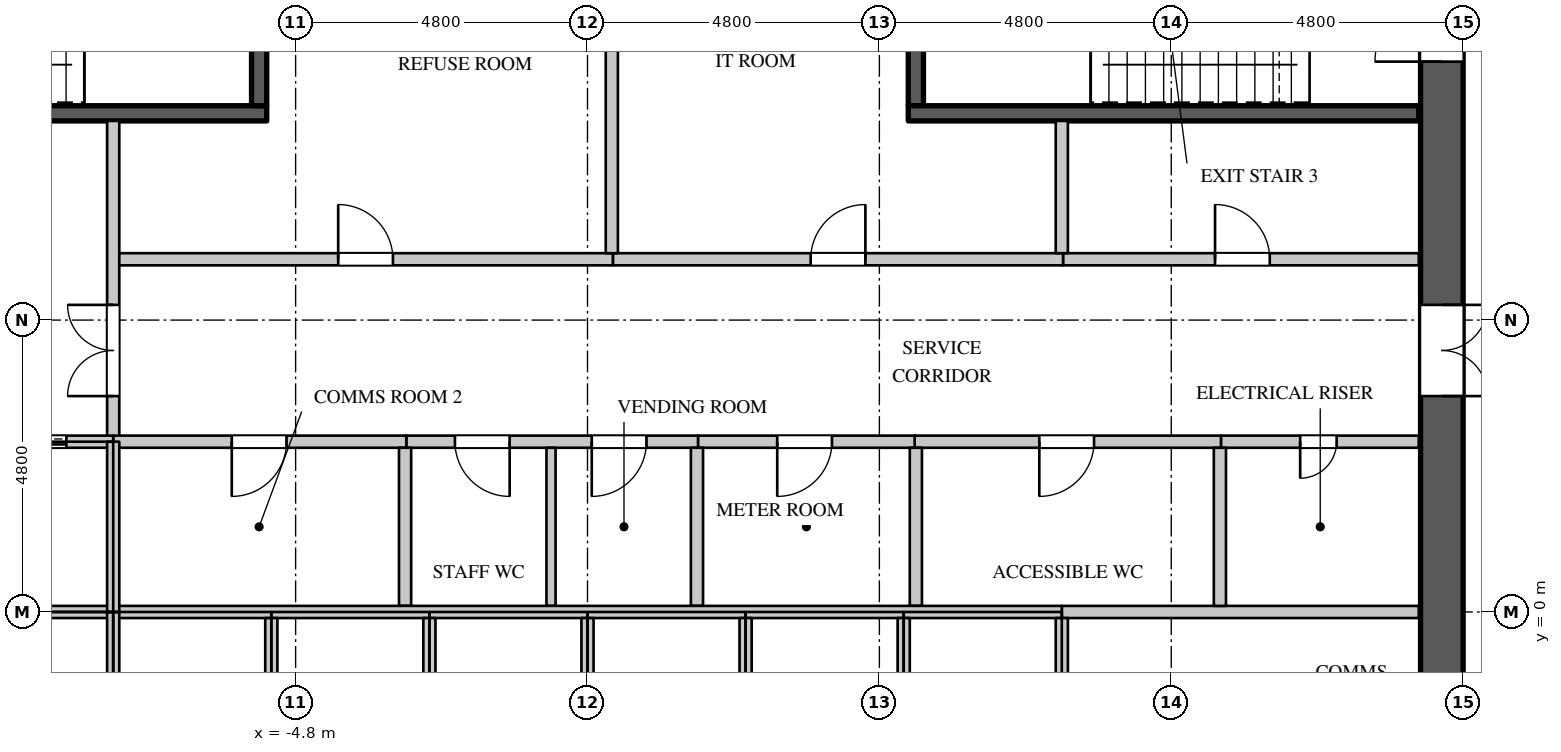
"""IFC4 building model, lengths in metres.
Left out: names, types, materials, properties, quantities, classifications, styles, units other than length and angle.
Written with IfcOpenShell. Run it as: python <this file> out.ifc"""

import sys

from ifc_helpers import new_model, si_unit, direction, frame, frame_2d, origin, place, context, subcontext, project, spatial, rectangle, extrude, element, fill, save


model = new_model("IFC4")
c1 = context("Model", 3, precision=1e-05, world=origin(), true_north=direction((0.0, 1.0)))
c2 = subcontext(c1, "Body", "Model", "MODEL_VIEW")
j1 = project(units=[si_unit("LENGTHUNIT", "METRE"), si_unit("PLANEANGLEUNIT", "RADIAN")], contexts=[c1])
p1 = place(None, origin())
s1 = spatial("IfcSite", under=j1, at=p1, CompositionType="ELEMENT")
p2 = place(p1, origin())
s2 = spatial("IfcBuilding", under=s1, at=p2, CompositionType="ELEMENT")
p3 = place(p2, frame((0.0, 0.0, 187.5)))
s3 = spatial("IfcBuildingStorey", under=s2, at=p3, CompositionType="ELEMENT", Elevation=187.5)
p4 = place(p3, frame((14.05, -11.3, 0.0), z_axis=(0.0, 0.0, 1.0), x_axis=(0.0, 1.0, 0.0)))
e1 = element("IfcWall", 1, at=p4, inside=s3, PredefinedType="SHEAR", context=c2, shape_type="SweptSolid", body=[
    extrude(rectangle(XDim=22.6, YDim=0.7, at=frame_2d((11.3, 0.0))), origin(), (0.0, 0.0, 1.0), 4.2),
])
p5 = place(p4, frame((20.35, 0.0, 0.0)))
e2 = element("IfcOpeningElement", 2, at=p5, cuts=e1, PredefinedType="OPENING", context=c2, shape_type="SweptSolid", body=[
    extrude(rectangle(XDim=1.1, YDim=2.2, at=frame_2d((0.55, 1.1))), frame((0.0, 0.36, 0.0), z_axis=(0.0, -1.0, 0.0), x_axis=(1.0, 0.0, 0.0)), (0.0, 0.0, 1.0), 0.72),
])
p6 = place(p4, frame((1.15, 0.0, 0.0)))
e3 = element("IfcOpeningElement", 3, at=p6, cuts=e1, PredefinedType="OPENING", context=c2, shape_type="SweptSolid", body=[
    extrude(rectangle(XDim=1.1, YDim=2.2, at=frame_2d((0.55, 1.1))), frame((0.0, 0.36, 0.0), z_axis=(0.0, -1.0, 0.0), x_axis=(1.0, 0.0, 0.0)), (0.0, 0.0, 1.0), 0.72),
])
p7 = place(p4, frame((14.85, 0.0, 0.0)))
e4 = element("IfcOpeningElement", 4, at=p7, cuts=e1, PredefinedType="OPENING", context=c2, shape_type="SweptSolid", body=[
    extrude(rectangle(XDim=1.5, YDim=2.4, at=frame_2d((0.75, 1.2))), frame((0.0, 0.36, 0.0), z_axis=(0.0, -1.0, 0.0), x_axis=(1.0, 0.0, 0.0)), (0.0, 0.0, 1.0), 0.72),
])
p8 = place(p4, frame((6.25, 0.0, 0.0)))
e5 = element("IfcOpeningElement", 5, at=p8, cuts=e1, PredefinedType="OPENING", context=c2, shape_type="SweptSolid", body=[
    extrude(rectangle(XDim=1.5, YDim=2.4, at=frame_2d((0.75, 1.2))), frame((0.0, 0.36, 0.0), z_axis=(0.0, -1.0, 0.0), x_axis=(1.0, 0.0, 0.0)), (0.0, 0.0, 1.0), 0.72),
])
p9 = place(p3, frame((-7.8, 2.8, 0.0), z_axis=(0.0, 0.0, 1.0), x_axis=(0.0, 1.0, 0.0)))
e6 = element("IfcWall", 6, at=p9, inside=s3, PredefinedType="PARTITIONING", context=c2, shape_type="SweptSolid", body=[
    extrude(rectangle(XDim=5.275, YDim=0.2, at=frame_2d((2.637, 0.0))), origin(), (0.0, 0.0, 1.0), 3.95),
])
p10 = place(p9, frame((0.75, 0.0, 0.0)))
e7 = element("IfcOpeningElement", 7, at=p10, cuts=e6, PredefinedType="OPENING", context=c2, shape_type="SweptSolid", body=[
    extrude(rectangle(XDim=1.5, YDim=2.4, at=frame_2d((0.75, 1.2))), frame((0.0, 0.11, 0.0), z_axis=(0.0, -1.0, 0.0), x_axis=(1.0, 0.0, 0.0)), (0.0, 0.0, 1.0), 0.22),
])
p11 = place(p3, frame((-7.7, 5.8, 0.0), z_axis=(0.0, 0.0, 1.0), x_axis=(1.0, 0.0, 0.0)))
e8 = element("IfcWall", 8, at=p11, inside=s3, PredefinedType="PARTITIONING", context=c2, shape_type="SweptSolid", body=[
    extrude(rectangle(XDim=8.12, YDim=0.2, at=frame_2d((4.06, 0.0))), origin(), (0.0, 0.0, 1.0), 3.95),
])
p12 = place(p11, frame((3.6, 0.0, 0.0)))
e9 = element("IfcOpeningElement", 9, at=p12, cuts=e8, PredefinedType="OPENING", context=c2, shape_type="SweptSolid", body=[
    extrude(rectangle(XDim=0.9, YDim=2.2, at=frame_2d((0.45, 1.1))), frame((0.0, 0.11, 0.0), z_axis=(0.0, -1.0, 0.0), x_axis=(1.0, 0.0, 0.0)), (0.0, 0.0, 1.0), 0.22),
])
p13 = place(p3, frame((-2.98, 2.8, 0.0), z_axis=(0.0, 0.0, 1.0), x_axis=(1.0, 0.0, 0.0)))
e10 = element("IfcWall", 10, at=p13, inside=s3, PredefinedType="PARTITIONING", context=c2, shape_type="SweptSolid", body=[
    extrude(rectangle(XDim=4.8, YDim=0.2, at=frame_2d((2.4, 0.0))), origin(), (0.0, 0.0, 1.0), 3.95),
])
p14 = place(p13, frame((0.8, 0.0, 0.0)))
e11 = element("IfcOpeningElement", 11, at=p14, cuts=e10, PredefinedType="OPENING", context=c2, shape_type="SweptSolid", body=[
    extrude(rectangle(XDim=0.9, YDim=2.2, at=frame_2d((0.45, 1.1))), frame((0.0, 0.11, 0.0), z_axis=(0.0, -1.0, 0.0), x_axis=(1.0, 0.0, 0.0)), (0.0, 0.0, 1.0), 0.22),
])
p15 = place(p13, frame((3.05, 0.0, 0.0)))
e12 = element("IfcOpeningElement", 12, at=p15, cuts=e10, PredefinedType="OPENING", context=c2, shape_type="SweptSolid", body=[
    extrude(rectangle(XDim=0.9, YDim=2.2, at=frame_2d((0.45, 1.1))), frame((0.0, 0.11, 0.0), z_axis=(0.0, -1.0, 0.0), x_axis=(1.0, 0.0, 0.0)), (0.0, 0.0, 1.0), 0.22),
])
p16 = place(p3, frame((5.38, 2.8, 0.0), z_axis=(0.0, 0.0, 1.0), x_axis=(1.0, 0.0, 0.0)))
e13 = element("IfcWall", 13, at=p16, inside=s3, PredefinedType="PARTITIONING", context=c2, shape_type="SweptSolid", body=[
    extrude(rectangle(XDim=5.04, YDim=0.2, at=frame_2d((2.52, 0.0))), origin(), (0.0, 0.0, 1.0), 3.95),
])
p17 = place(p16, frame((2.05, 0.0, 0.0)))
e14 = element("IfcOpeningElement", 14, at=p17, cuts=e13, PredefinedType="OPENING", context=c2, shape_type="SweptSolid", body=[
    extrude(rectangle(XDim=0.9, YDim=2.2, at=frame_2d((0.45, 1.1))), frame((0.0, 0.11, 0.0), z_axis=(0.0, -1.0, 0.0), x_axis=(1.0, 0.0, 0.0)), (0.0, 0.0, 1.0), 0.22),
])
p18 = place(p3, frame((7.82, 5.8, 0.0), z_axis=(0.0, 0.0, 1.0), x_axis=(1.0, 0.0, 0.0)))
e15 = element("IfcWall", 15, at=p18, inside=s3, PredefinedType="PARTITIONING", context=c2, shape_type="SweptSolid", body=[
    extrude(rectangle(XDim=5.85, YDim=0.2, at=frame_2d((2.925, 0.0))), origin(), (0.0, 0.0, 1.0), 3.95),
])
p19 = place(p18, frame((2.5, 0.0, 0.0)))
e16 = element("IfcOpeningElement", 16, at=p19, cuts=e15, PredefinedType="OPENING", context=c2, shape_type="SweptSolid", body=[
    extrude(rectangle(XDim=0.9, YDim=2.2, at=frame_2d((0.45, 1.1))), frame((0.0, 0.11, 0.0), z_axis=(0.0, -1.0, 0.0), x_axis=(1.0, 0.0, 0.0)), (0.0, 0.0, 1.0), 0.22),
])
p20 = place(p3, frame((-0.6, 0.1, 0.0), z_axis=(0.0, 0.0, 1.0), x_axis=(0.0, 1.0, 0.0)))
e17 = element("IfcWall", 17, at=p20, inside=s3, PredefinedType="PARTITIONING", context=c2, shape_type="SweptSolid", body=[
    extrude(rectangle(XDim=2.6, YDim=0.15, at=frame_2d((1.3, 0.0))), origin(), (0.0, 0.0, 1.0), 3.95),
])
p21 = place(p3, frame((-7.8, 2.8, 0.0), z_axis=(0.0, 0.0, 1.0), x_axis=(1.0, 0.0, 0.0)))
e18 = element("IfcWall", 18, at=p21, inside=s3, PredefinedType="PARTITIONING", context=c2, shape_type="SweptSolid", body=[
    extrude(rectangle(XDim=4.82, YDim=0.2, at=frame_2d((2.41, 0.0))), origin(), (0.0, 0.0, 1.0), 3.95),
])
p22 = place(p21, frame((1.95, 0.0, 0.0)))
e19 = element("IfcOpeningElement", 19, at=p22, cuts=e18, PredefinedType="OPENING", context=c2, shape_type="SweptSolid", body=[
    extrude(rectangle(XDim=0.9, YDim=2.2, at=frame_2d((0.45, 1.1))), frame((0.0, 0.11, 0.0), z_axis=(0.0, -1.0, 0.0), x_axis=(1.0, 0.0, 0.0)), (0.0, 0.0, 1.0), 0.22),
])
p23 = place(p3, frame((-3.0, 0.1, 0.0), z_axis=(0.0, 0.0, 1.0), x_axis=(0.0, 1.0, 0.0)))
e20 = element("IfcWall", 20, at=p23, inside=s3, PredefinedType="PARTITIONING", context=c2, shape_type="SweptSolid", body=[
    extrude(rectangle(XDim=2.6, YDim=0.2, at=frame_2d((1.3, 0.0))), origin(), (0.0, 0.0, 1.0), 3.95),
])
p24 = place(p3, frame((0.42, 5.8, 0.0), z_axis=(0.0, 0.0, 1.0), x_axis=(1.0, 0.0, 0.0)))
e21 = element("IfcWall", 21, at=p24, inside=s3, PredefinedType="PARTITIONING", context=c2, shape_type="SweptSolid", body=[
    extrude(rectangle(XDim=7.4, YDim=0.2, at=frame_2d((3.7, 0.0))), origin(), (0.0, 0.0, 1.0), 3.95),
])
p25 = place(p24, frame((3.25, 0.0, 0.0)))
e22 = element("IfcOpeningElement", 22, at=p25, cuts=e21, PredefinedType="OPENING", context=c2, shape_type="SweptSolid", body=[
    extrude(rectangle(XDim=0.9, YDim=2.2, at=frame_2d((0.45, 1.1))), frame((0.0, 0.11, 0.0), z_axis=(0.0, -1.0, 0.0), x_axis=(1.0, 0.0, 0.0)), (0.0, 0.0, 1.0), 0.22),
])
p26 = place(p3, frame((0.4, 5.9, 0.0), z_axis=(0.0, 0.0, 1.0), x_axis=(0.0, 1.0, 0.0)))
e23 = element("IfcWall", 23, at=p26, inside=s3, PredefinedType="PARTITIONING", context=c2, shape_type="SweptSolid", body=[
    extrude(rectangle(XDim=5.37, YDim=0.2, at=frame_2d((2.685, 0.0))), origin(), (0.0, 0.0, 1.0), 3.95),
])
p27 = place(p3, frame((1.82, 2.8, 0.0), z_axis=(0.0, 0.0, 1.0), x_axis=(1.0, 0.0, 0.0)))
e24 = element("IfcWall", 24, at=p27, inside=s3, PredefinedType="PARTITIONING", context=c2, shape_type="SweptSolid", body=[
    extrude(rectangle(XDim=3.56, YDim=0.2, at=frame_2d((1.78, 0.0))), origin(), (0.0, 0.0, 1.0), 3.95),
])
p28 = place(p27, frame((1.3, 0.0, 0.0)))
e25 = element("IfcOpeningElement", 25, at=p28, cuts=e24, PredefinedType="OPENING", context=c2, shape_type="SweptSolid", body=[
    extrude(rectangle(XDim=0.9, YDim=2.2, at=frame_2d((0.45, 1.1))), frame((0.0, 0.11, 0.0), z_axis=(0.0, -1.0, 0.0), x_axis=(1.0, 0.0, 0.0)), (0.0, 0.0, 1.0), 0.22),
])
for number, where, z_axis, x_axis in (
    (26, (1.8, 0.1, 0.0), (0.0, 0.0, 1.0), (0.0, 1.0, 0.0)),
    (27, (5.4, 0.1, 0.0), (0.0, 0.0, 1.0), (0.0, 1.0, 0.0)),
):
    element("IfcWall", number, at=place(p3, frame(where, z_axis=z_axis, x_axis=x_axis)), inside=s3, PredefinedType="PARTITIONING", context=c2, shape_type="SweptSolid", body=[
        extrude(rectangle(XDim=2.6, YDim=0.2, at=frame_2d((1.3, 0.0))), origin(), (0.0, 0.0, 1.0), 3.95),
    ])
p29 = place(p3, frame((7.8, 0.0, 0.0), z_axis=(0.0, 0.0, 1.0), x_axis=(1.0, 0.0, 0.0)))
e28 = element("IfcWall", 28, at=p29, inside=s3, PredefinedType="PARTITIONING", context=c2, shape_type="SweptSolid", body=[
    extrude(rectangle(XDim=5.87, YDim=0.2, at=frame_2d((2.935, 0.0))), origin(), (0.0, 0.0, 1.0), 3.95),
])
p30 = place(p3, frame((7.8, 5.9, 0.0), z_axis=(0.0, 0.0, 1.0), x_axis=(0.0, 1.0, 0.0)))
e29 = element("IfcWall", 29, at=p30, inside=s3, PredefinedType="PARTITIONING", context=c2, shape_type="SweptSolid", body=[
    extrude(rectangle(XDim=2.175, YDim=0.2, at=frame_2d((1.087, 0.0))), origin(), (0.0, 0.0, 1.0), 3.95),
])
p31 = place(p3, frame((10.42, 2.8, 0.0), z_axis=(0.0, 0.0, 1.0), x_axis=(1.0, 0.0, 0.0)))
e30 = element("IfcWall", 30, at=p31, inside=s3, PredefinedType="PARTITIONING", context=c2, shape_type="SweptSolid", body=[
    extrude(rectangle(XDim=3.25, YDim=0.2, at=frame_2d((1.625, 0.0))), origin(), (0.0, 0.0, 1.0), 3.95),
])
p32 = place(p31, frame((1.3, 0.0, 0.0)))
e31 = element("IfcOpeningElement", 31, at=p32, cuts=e30, PredefinedType="OPENING", context=c2, shape_type="SweptSolid", body=[
    extrude(rectangle(XDim=0.6, YDim=2.0, at=frame_2d((0.3, 1.0))), frame((0.0, 0.11, 0.0), z_axis=(0.0, -1.0, 0.0), x_axis=(1.0, 0.0, 0.0)), (0.0, 0.0, 1.0), 0.22),
])
p33 = place(p3, frame((10.4, 0.1, 0.0), z_axis=(0.0, 0.0, 1.0), x_axis=(0.0, 1.0, 0.0)))
e32 = element("IfcWall", 32, at=p33, inside=s3, PredefinedType="PARTITIONING", context=c2, shape_type="SweptSolid", body=[
    extrude(rectangle(XDim=2.6, YDim=0.2, at=frame_2d((1.3, 0.0))), origin(), (0.0, 0.0, 1.0), 3.95),
])
p34 = place(p3, frame((-13.67, 0.0, 0.0), z_axis=(0.0, 0.0, 1.0), x_axis=(1.0, 0.0, 0.0)))
e33 = element("IfcWall", 33, at=p34, inside=s3, PredefinedType="PARTITIONING", context=c2, shape_type="SweptSolid", body=[
    extrude(rectangle(XDim=21.47, YDim=0.2, at=frame_2d((10.735, 0.0))), origin(), (0.0, 0.0, 1.0), 3.95),
])
p35 = place(p3, frame((-13.67, 2.8, 0.0), z_axis=(0.0, 0.0, 1.0), x_axis=(1.0, 0.0, 0.0)))
e34 = element("IfcWall", 34, at=p35, inside=s3, PredefinedType="PARTITIONING", context=c2, shape_type="SweptSolid", body=[
    extrude(rectangle(XDim=5.87, YDim=0.2, at=frame_2d((2.935, 0.0))), origin(), (0.0, 0.0, 1.0), 3.95),
])
p36 = place(p35, frame((1.05, 0.0, 0.0)))
e35 = element("IfcOpeningElement", 35, at=p36, cuts=e34, PredefinedType="OPENING", context=c2, shape_type="SweptSolid", body=[
    extrude(rectangle(XDim=1.1, YDim=2.2, at=frame_2d((0.55, 1.1))), frame((0.0, 0.11, 0.0), z_axis=(0.0, -1.0, 0.0), x_axis=(1.0, 0.0, 0.0)), (0.0, 0.0, 1.0), 0.22),
])
p37 = place(p35, frame((4.0, 0.0, 0.0)))
e36 = element("IfcOpeningElement", 36, at=p37, cuts=e34, PredefinedType="OPENING", context=c2, shape_type="SweptSolid", body=[
    extrude(rectangle(XDim=1.1, YDim=2.2, at=frame_2d((0.55, 1.1))), frame((0.0, 0.11, 0.0), z_axis=(0.0, -1.0, 0.0), x_axis=(1.0, 0.0, 0.0)), (0.0, 0.0, 1.0), 0.22),
])
for number, where, z_axis, x_axis in (
    (37, (-7.8, -2.8, 0.0), (0.0, 0.0, 1.0), (0.0, 1.0, 0.0)),
    (38, (-7.8, 0.0, 0.0), (0.0, 0.0, 1.0), (0.0, 1.0, 0.0)),
):
    element("IfcWall", number, at=place(p3, frame(where, z_axis=z_axis, x_axis=x_axis)), inside=s3, PredefinedType="PARTITIONING", context=c2, shape_type="SweptSolid", body=[
        extrude(rectangle(XDim=2.8, YDim=0.2, at=frame_2d((1.4, 0.0))), origin(), (0.0, 0.0, 1.0), 3.95),
    ])
for number, where, z_axis, x_axis in (
    (39, (-5.2, -2.7, 0.0), (0.0, 0.0, 1.0), (0.0, 1.0, 0.0)),
    (40, (-2.6, -2.7, 0.0), (0.0, 0.0, 1.0), (0.0, 1.0, 0.0)),
    (41, (0.0, -2.7, 0.0), (0.0, 0.0, 1.0), (0.0, 1.0, 0.0)),
    (42, (2.6, -2.7, 0.0), (0.0, 0.0, 1.0), (0.0, 1.0, 0.0)),
    (43, (5.2, -2.7, 0.0), (0.0, 0.0, 1.0), (0.0, 1.0, 0.0)),
    (44, (7.8, -2.7, 0.0), (0.0, 0.0, 1.0), (0.0, 1.0, 0.0)),
):
    element("IfcWall", number, at=place(p3, frame(where, z_axis=z_axis, x_axis=x_axis)), inside=s3, PredefinedType="PARTITIONING", context=c2, shape_type="SweptSolid", body=[
        extrude(rectangle(XDim=2.6, YDim=0.2, at=frame_2d((1.3, 0.0))), origin(), (0.0, 0.0, 1.0), 3.95),
    ])
p38 = place(p3, frame((-13.67, 8.2, 0.0), z_axis=(0.0, 0.0, 1.0), x_axis=(1.0, 0.0, 0.0)))
e45 = element("IfcWall", 45, at=p38, inside=s3, PredefinedType="SHEAR", context=c2, shape_type="SweptSolid", body=[
    extrude(rectangle(XDim=8.395, YDim=0.25, at=frame_2d((4.198, 0.0))), origin(), (0.0, 0.0, 1.0), 3.95),
])
p39 = place(p38, frame((0.15, 0.0, 0.0)))
e46 = element("IfcOpeningElement", 46, at=p39, cuts=e45, PredefinedType="OPENING", context=c2, shape_type="SweptSolid", body=[
    extrude(rectangle(XDim=1.1, YDim=2.2, at=frame_2d((0.55, 1.1))), frame((0.0, 0.135, 0.0), z_axis=(0.0, -1.0, 0.0), x_axis=(1.0, 0.0, 0.0)), (0.0, 0.0, 1.0), 0.27),
])
for number, where, z_axis, x_axis in (
    (47, (-5.4, 8.325, 0.0), (0.0, 0.0, 1.0), (0.0, 1.0, 0.0)),
    (48, (5.4, 8.325, 0.0), (0.0, 0.0, 1.0), (0.0, 1.0, 0.0)),
):
    element("IfcWall", number, at=place(p3, frame(where, z_axis=z_axis, x_axis=x_axis)), inside=s3, PredefinedType="SHEAR", context=c2, shape_type="SweptSolid", body=[
        extrude(rectangle(XDim=2.945, YDim=0.25, at=frame_2d((1.473, 0.0))), origin(), (0.0, 0.0, 1.0), 3.95),
    ])
p40 = place(p3, frame((5.275, 8.2, 0.0), z_axis=(0.0, 0.0, 1.0), x_axis=(1.0, 0.0, 0.0)))
e49 = element("IfcWall", 49, at=p40, inside=s3, PredefinedType="SHEAR", context=c2, shape_type="SweptSolid", body=[
    extrude(rectangle(XDim=8.395, YDim=0.25, at=frame_2d((4.198, 0.0))), origin(), (0.0, 0.0, 1.0), 3.95),
])
p41 = place(p32, origin())
e50 = element("IfcDoor", 50, at=p41, inside=s3, OperationType="SINGLE_SWING_RIGHT", PredefinedType="DOOR", context=c2, shape_type="SweptSolid", body=[
    extrude(rectangle(XDim=0.6, YDim=2.0, at=frame_2d((0.3, 1.0))), frame((0.0, 0.025, 0.0), z_axis=(0.0, -1.0, 0.0), x_axis=(1.0, 0.0, 0.0)), (0.0, 0.0, 1.0), 0.05),
])
fill(e31, e50)
p42 = place(p12, origin())
e51 = element("IfcDoor", 51, at=p42, inside=s3, OperationType="SINGLE_SWING_LEFT", PredefinedType="DOOR", context=c2, shape_type="SweptSolid", body=[
    extrude(rectangle(XDim=0.9, YDim=2.2, at=frame_2d((0.45, 1.1))), frame((0.0, 0.025, 0.0), z_axis=(0.0, -1.0, 0.0), x_axis=(1.0, 0.0, 0.0)), (0.0, 0.0, 1.0), 0.05),
])
fill(e9, e51)
p43 = place(p25, origin())
e52 = element("IfcDoor", 52, at=p43, inside=s3, OperationType="SINGLE_SWING_RIGHT", PredefinedType="DOOR", context=c2, shape_type="SweptSolid", body=[
    extrude(rectangle(XDim=0.9, YDim=2.2, at=frame_2d((0.45, 1.1))), frame((0.0, 0.025, 0.0), z_axis=(0.0, -1.0, 0.0), x_axis=(1.0, 0.0, 0.0)), (0.0, 0.0, 1.0), 0.05),
])
fill(e22, e52)
p44 = place(p19, origin())
e53 = element("IfcDoor", 53, at=p44, inside=s3, OperationType="SINGLE_SWING_LEFT", PredefinedType="DOOR", context=c2, shape_type="SweptSolid", body=[
    extrude(rectangle(XDim=0.9, YDim=2.2, at=frame_2d((0.45, 1.1))), frame((0.0, 0.025, 0.0), z_axis=(0.0, -1.0, 0.0), x_axis=(1.0, 0.0, 0.0)), (0.0, 0.0, 1.0), 0.05),
])
fill(e16, e53)
p45 = place(p22, origin())
e54 = element("IfcDoor", 54, at=p45, inside=s3, OperationType="SINGLE_SWING_RIGHT", PredefinedType="DOOR", context=c2, shape_type="SweptSolid", body=[
    extrude(rectangle(XDim=0.9, YDim=2.2, at=frame_2d((0.45, 1.1))), frame((0.0, 0.025, 0.0), z_axis=(0.0, -1.0, 0.0), x_axis=(1.0, 0.0, 0.0)), (0.0, 0.0, 1.0), 0.05),
])
fill(e19, e54)
p46 = place(p14, origin())
e55 = element("IfcDoor", 55, at=p46, inside=s3, OperationType="SINGLE_SWING_LEFT", PredefinedType="DOOR", context=c2, shape_type="SweptSolid", body=[
    extrude(rectangle(XDim=0.9, YDim=2.2, at=frame_2d((0.45, 1.1))), frame((0.0, 0.025, 0.0), z_axis=(0.0, -1.0, 0.0), x_axis=(1.0, 0.0, 0.0)), (0.0, 0.0, 1.0), 0.05),
])
fill(e11, e55)
p47 = place(p15, origin())
e56 = element("IfcDoor", 56, at=p47, inside=s3, OperationType="SINGLE_SWING_RIGHT", PredefinedType="DOOR", context=c2, shape_type="SweptSolid", body=[
    extrude(rectangle(XDim=0.9, YDim=2.2, at=frame_2d((0.45, 1.1))), frame((0.0, 0.025, 0.0), z_axis=(0.0, -1.0, 0.0), x_axis=(1.0, 0.0, 0.0)), (0.0, 0.0, 1.0), 0.05),
])
fill(e12, e56)
p48 = place(p28, origin())
e57 = element("IfcDoor", 57, at=p48, inside=s3, OperationType="SINGLE_SWING_RIGHT", PredefinedType="DOOR", context=c2, shape_type="SweptSolid", body=[
    extrude(rectangle(XDim=0.9, YDim=2.2, at=frame_2d((0.45, 1.1))), frame((0.0, 0.025, 0.0), z_axis=(0.0, -1.0, 0.0), x_axis=(1.0, 0.0, 0.0)), (0.0, 0.0, 1.0), 0.05),
])
fill(e25, e57)
p49 = place(p17, origin())
e58 = element("IfcDoor", 58, at=p49, inside=s3, OperationType="SINGLE_SWING_RIGHT", PredefinedType="DOOR", context=c2, shape_type="SweptSolid", body=[
    extrude(rectangle(XDim=0.9, YDim=2.2, at=frame_2d((0.45, 1.1))), frame((0.0, 0.025, 0.0), z_axis=(0.0, -1.0, 0.0), x_axis=(1.0, 0.0, 0.0)), (0.0, 0.0, 1.0), 0.05),
])
fill(e14, e58)
p50 = place(p37, origin())
e59 = element("IfcDoor", 59, at=p50, inside=s3, OperationType="DOUBLE_DOOR_SLIDING", PredefinedType="DOOR", context=c2, shape_type="SweptSolid", body=[
    extrude(rectangle(XDim=1.1, YDim=2.2, at=frame_2d((0.55, 1.1))), frame((0.0, 0.025, 0.0), z_axis=(0.0, -1.0, 0.0), x_axis=(1.0, 0.0, 0.0)), (0.0, 0.0, 1.0), 0.05),
])
fill(e36, e59)
p51 = place(p10, origin())
e60 = element("IfcDoor", 60, at=p51, inside=s3, OperationType="DOUBLE_DOOR_SINGLE_SWING", PredefinedType="DOOR", context=c2, shape_type="SweptSolid", body=[
    extrude(rectangle(XDim=1.5, YDim=2.4, at=frame_2d((0.75, 1.2))), frame((0.0, 0.025, 0.0), z_axis=(0.0, -1.0, 0.0), x_axis=(1.0, 0.0, 0.0)), (0.0, 0.0, 1.0), 0.05),
])
fill(e7, e60)
p52 = place(p5, origin())
e61 = element("IfcDoor", 61, at=p52, inside=s3, OperationType="SINGLE_SWING_LEFT", PredefinedType="DOOR", context=c2, shape_type="SweptSolid", body=[
    extrude(rectangle(XDim=1.1, YDim=2.2, at=frame_2d((0.55, 1.1))), frame((0.0, 0.345, 0.0), z_axis=(0.0, -1.0, 0.0), x_axis=(1.0, 0.0, 0.0)), (0.0, 0.0, 1.0), 0.05),
])
fill(e2, e61)
p53 = place(p7, origin())
e62 = element("IfcDoor", 62, at=p53, inside=s3, OperationType="DOUBLE_DOOR_SINGLE_SWING", PredefinedType="DOOR", context=c2, shape_type="SweptSolid", body=[
    extrude(rectangle(XDim=1.5, YDim=2.4, at=frame_2d((0.75, 1.2))), frame((0.0, -0.295, 0.0), z_axis=(0.0, -1.0, 0.0), x_axis=(1.0, 0.0, 0.0)), (0.0, 0.0, 1.0), 0.05),
])
fill(e4, e62)
save(model, sys.argv[1])
